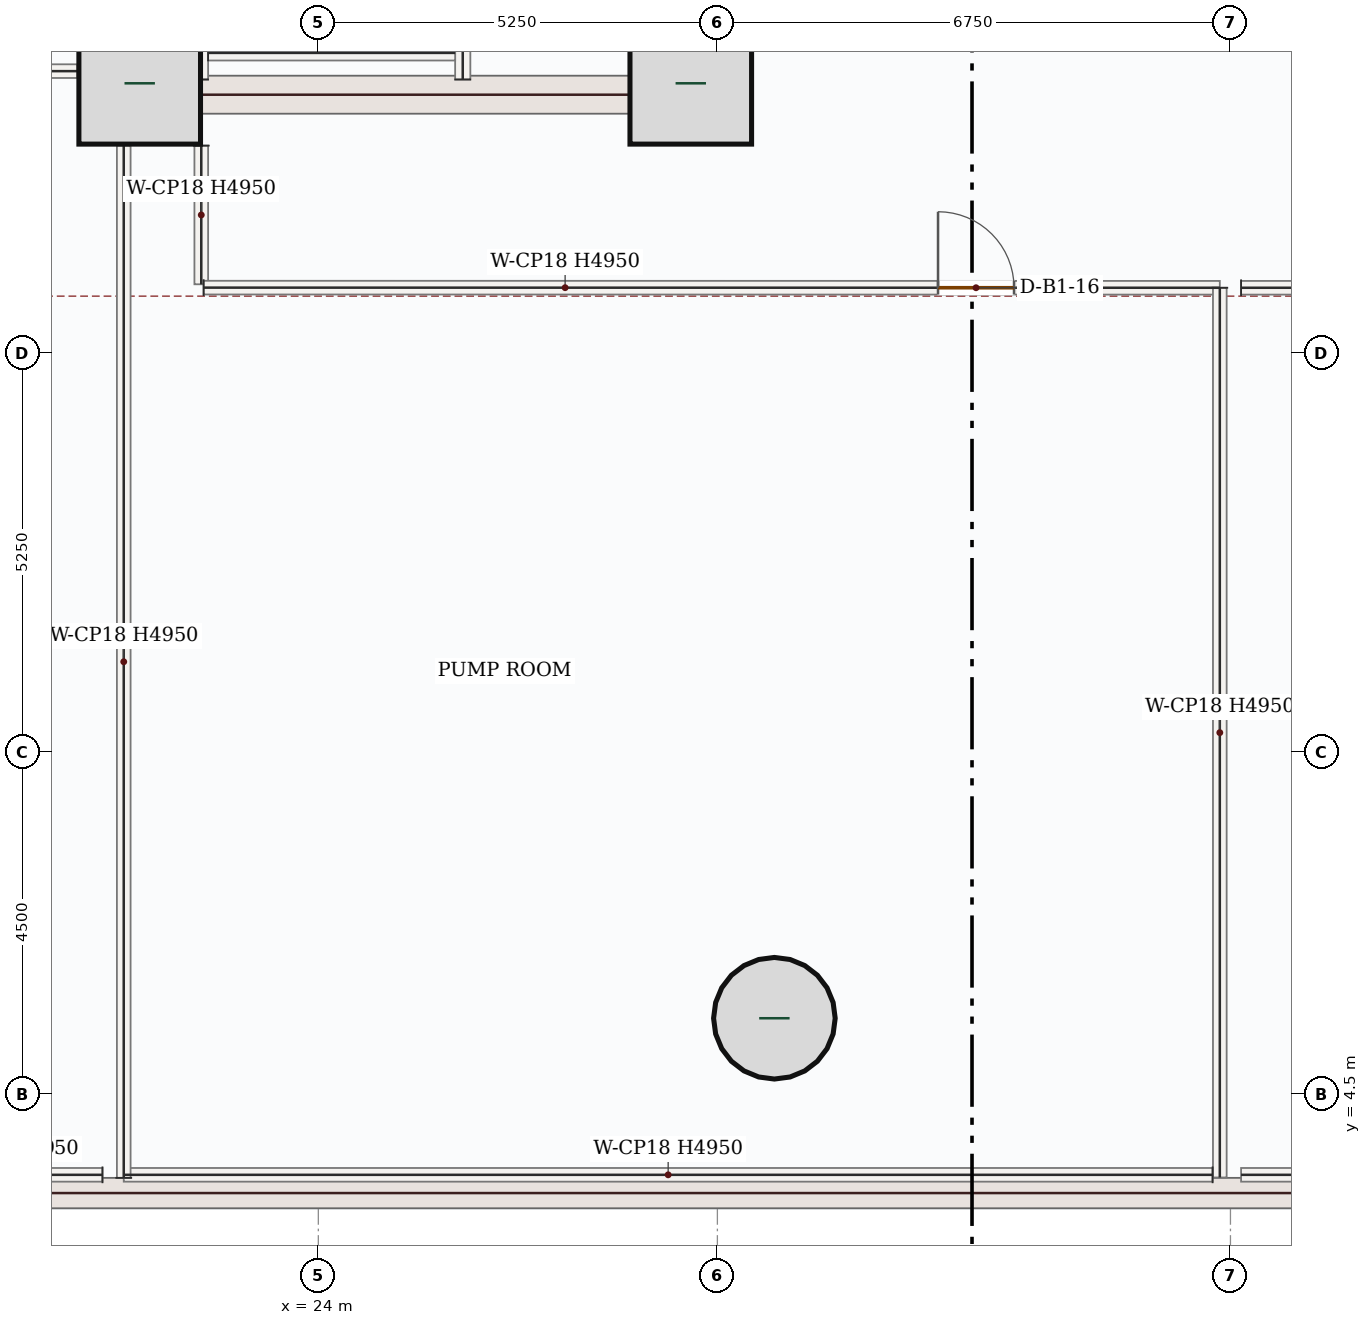
"""IFC4 building model, lengths in metres.
Left out: names, types, materials, properties, quantities, classifications, styles, units other than length and angle.
Written with IfcOpenShell. Run it as: python <this file> out.ifc"""

import sys

from ifc_helpers import new_model, si_unit, direction, frame, frame_2d, origin, origin_2d, place, context, subcontext, project, spatial, rectangle, hollow_circle, extrude, source, transform, mapped, element, fill, save


model = new_model("IFC4")
c1 = context("Model", 3, precision=1e-05, world=origin(), true_north=direction((0.0, 1.0)))
c2 = subcontext(c1, "Body", "Model", "MODEL_VIEW")
j1 = project(units=[si_unit("LENGTHUNIT", "METRE"), si_unit("PLANEANGLEUNIT", "RADIAN")], contexts=[c1])
p1 = place(None, origin())
s1 = spatial("IfcSite", under=j1, at=p1, CompositionType="ELEMENT")
p2 = place(p1, origin())
s2 = spatial("IfcBuilding", under=s1, at=p2, CompositionType="ELEMENT")
p3 = place(p2, frame((0.0, 0.0, -5.4)))
s3 = spatial("IfcBuildingStorey", under=s2, at=p3, CompositionType="ELEMENT", Elevation=-5.4)
m1 = source(origin(), c2, "Body", "SweptSolid", [
    extrude(rectangle(XDim=64.2, YDim=0.4, at=frame_2d((32.1, 0.0))), origin(), (0.0, 0.0, 1.0), 5.05),
])
p4 = place(p3, frame((3.9, 3.2, 0.0), z_axis=(0.0, 0.0, 1.0), x_axis=(1.0, 0.0, 0.0)))
e1 = element("IfcWall", 1, at=p4, inside=s3, PredefinedType="SHEAR", context=c2, shape_type="MappedRepresentation", body=[
    mapped(m1, transform((0.0, 0.0, 0.0), x_axis=(1.0, 0.0, 0.0), y_axis=(0.0, 1.0, 0.0), z_axis=(0.0, 0.0, 1.0), scale=1.0)),
])
m2 = source(origin(), c2, "Body", "SweptSolid", [
    extrude(rectangle(XDim=8.55, YDim=0.5, at=frame_2d((4.275, 0.0))), origin(), (0.0, 0.0, 1.0), 4.95),
])
p5 = place(p3, frame((21.5, 17.4, 0.0), z_axis=(0.0, 0.0, 1.0), x_axis=(0.0, 1.0, 0.0)))
e2 = element("IfcWall", 2, at=p5, inside=s3, PredefinedType="SHEAR", context=c2, shape_type="MappedRepresentation", body=[
    mapped(m2, transform((0.0, 0.0, 0.0), x_axis=(1.0, 0.0, 0.0), y_axis=(0.0, 1.0, 0.0), z_axis=(0.0, 0.0, 1.0), scale=1.0)),
])
p6 = place(p3, frame((29.0, 17.4, 0.0), z_axis=(0.0, 0.0, 1.0), x_axis=(0.0, 1.0, 0.0)))
e3 = element("IfcWall", 3, at=p6, inside=s3, PredefinedType="SHEAR", context=c2, shape_type="SweptSolid", body=[
    extrude(rectangle(XDim=8.55, YDim=0.5, at=frame_2d((4.275, 0.0))), origin(), (0.0, 0.0, 1.0), 4.95),
])
p7 = place(p6, frame((6.65, 0.0, 0.0)))
e4 = element("IfcOpeningElement", 4, at=p7, cuts=e3, PredefinedType="OPENING", context=c2, shape_type="SweptSolid", body=[
    extrude(rectangle(XDim=1.1, YDim=2.2, at=frame_2d((0.55, 1.1))), frame((0.0, 0.26, 0.0), z_axis=(0.0, -1.0, 0.0), x_axis=(1.0, 0.0, 0.0)), (0.0, 0.0, 1.0), 0.52),
])
p8 = place(p6, frame((2.7, 0.0, 0.0)))
e5 = element("IfcOpeningElement", 5, at=p8, cuts=e3, PredefinedType="OPENING", context=c2, shape_type="SweptSolid", body=[
    extrude(rectangle(XDim=0.88, YDim=2.1, at=frame_2d((0.44, 1.05))), frame((0.0, 0.26, 0.0), z_axis=(0.0, -1.0, 0.0), x_axis=(1.0, 0.0, 0.0)), (0.0, 0.0, 1.0), 0.52),
])
p9 = place(p6, frame((4.6, 0.0, 0.0)))
e6 = element("IfcOpeningElement", 6, at=p9, cuts=e3, PredefinedType="OPENING", context=c2, shape_type="SweptSolid", body=[
    extrude(rectangle(XDim=0.88, YDim=2.1, at=frame_2d((0.44, 1.05))), frame((0.0, 0.26, 0.0), z_axis=(0.0, -1.0, 0.0), x_axis=(1.0, 0.0, 0.0)), (0.0, 0.0, 1.0), 0.52),
])
m3 = source(origin(), c2, "Body", "SweptSolid", [
    extrude(rectangle(XDim=7.0, YDim=0.5, at=frame_2d((3.5, 0.0))), origin(), (0.0, 0.0, 1.0), 4.95),
])
p10 = place(p3, frame((21.75, 17.65, 0.0), z_axis=(0.0, 0.0, 1.0), x_axis=(1.0, 0.0, 0.0)))
e7 = element("IfcWall", 7, at=p10, inside=s3, PredefinedType="SHEAR", context=c2, shape_type="MappedRepresentation", body=[
    mapped(m3, transform((0.0, 0.0, 0.0), x_axis=(1.0, 0.0, 0.0), y_axis=(0.0, 1.0, 0.0), z_axis=(0.0, 0.0, 1.0), scale=1.0)),
])
m4 = source(origin(), c2, "Body", "SweptSolid", [
    extrude(rectangle(XDim=1.6, YDim=1.6, at=origin_2d()), origin(), (0.0, 0.0, 1.0), 5.4),
])
for number, where, z_axis, x_axis in (
    (8, (21.65, 17.8, 0.0), (0.0, 0.0, 1.0), (1.0, 0.0, 0.0)),
    (9, (28.9, 17.8, 0.0), (0.0, 0.0, 1.0), (1.0, 0.0, 0.0)),
):
    element("IfcColumn", number, at=place(p3, frame(where, z_axis=z_axis, x_axis=x_axis)), inside=s3, PredefinedType="COLUMN", context=c2, shape_type="MappedRepresentation", body=[
        mapped(m4, transform((0.0, 0.0, 0.0), x_axis=(1.0, 0.0, 0.0), y_axis=(0.0, 1.0, 0.0), z_axis=(0.0, 0.0, 1.0), scale=1.0)),
    ])
m5 = source(origin(), c2, "Body", "SweptSolid", [
    extrude(hollow_circle(Radius=0.8, WallThickness=0.06, at=origin_2d()), origin(), (0.0, 0.0, 1.0), 5.4),
])
p11 = place(p3, frame((30.0, 5.5, 0.0), z_axis=(0.0, 0.0, 1.0), x_axis=(1.0, 0.0, 0.0)))
e10 = element("IfcColumn", 10, at=p11, inside=s3, PredefinedType="COLUMN", context=c2, shape_type="MappedRepresentation", body=[
    mapped(m5, transform((0.0, 0.0, 0.0), x_axis=(1.0, 0.0, 0.0), y_axis=(0.0, 1.0, 0.0), z_axis=(0.0, 0.0, 1.0), scale=1.0)),
])
m6 = source(origin(), c2, "Body", "SweptSolid", [
    extrude(rectangle(XDim=7.87, YDim=0.2, at=frame_2d((3.935, 0.0))), origin(), (0.0, 0.0, 1.0), 4.95),
])
p12 = place(p3, frame((22.45, 17.85, 0.0), z_axis=(0.0, 0.0, 1.0), x_axis=(0.0, 1.0, 0.0)))
e11 = element("IfcWall", 11, at=p12, inside=s3, PredefinedType="SOLIDWALL", context=c2, shape_type="MappedRepresentation", body=[
    mapped(m6, transform((0.0, 0.0, 0.0), x_axis=(1.0, 0.0, 0.0), y_axis=(0.0, 1.0, 0.0), z_axis=(0.0, 0.0, 1.0), scale=1.0)),
])
p13 = place(p3, frame((25.9, 17.85, 0.0), z_axis=(0.0, 0.0, 1.0), x_axis=(0.0, 1.0, 0.0)))
e12 = element("IfcWall", 12, at=p13, inside=s3, PredefinedType="SOLIDWALL", context=c2, shape_type="SweptSolid", body=[
    extrude(rectangle(XDim=8.0, YDim=0.2, at=frame_2d((4.0, 0.0))), origin(), (0.0, 0.0, 1.0), 4.95),
])
p14 = place(p13, frame((6.3, 0.0, 0.0)))
e13 = element("IfcOpeningElement", 13, at=p14, cuts=e12, PredefinedType="OPENING", context=c2, shape_type="SweptSolid", body=[
    extrude(rectangle(XDim=1.05, YDim=2.15, at=frame_2d((0.525, 1.075))), frame((0.0, 0.11, 0.0), z_axis=(0.0, -1.0, 0.0), x_axis=(1.0, 0.0, 0.0)), (0.0, 0.0, 1.0), 0.22),
])
m7 = source(origin(), c2, "Body", "SweptSolid", [
    extrude(rectangle(XDim=3.25, YDim=0.2, at=frame_2d((1.625, 0.0))), origin(), (0.0, 0.0, 1.0), 4.95),
])
p15 = place(p3, frame((22.55, 18.2, 0.0), z_axis=(0.0, 0.0, 1.0), x_axis=(1.0, 0.0, 0.0)))
e14 = element("IfcWall", 14, at=p15, inside=s3, PredefinedType="SOLIDWALL", context=c2, shape_type="MappedRepresentation", body=[
    mapped(m7, transform((0.0, 0.0, 0.0), x_axis=(1.0, 0.0, 0.0), y_axis=(0.0, 1.0, 0.0), z_axis=(0.0, 0.0, 1.0), scale=1.0)),
])
m8 = source(origin(), c2, "Body", "SweptSolid", [
    extrude(rectangle(XDim=1.824, YDim=0.18, at=frame_2d((0.912, 0.0))), origin(), (0.0, 0.0, 1.0), 4.95),
])
p16 = place(p3, frame((22.46, 16.98, 0.0), z_axis=(0.0, 0.0, 1.0), x_axis=(0.0, -1.0, 0.0)))
e15 = element("IfcWall", 15, at=p16, inside=s3, PredefinedType="PARTITIONING", context=c2, shape_type="MappedRepresentation", body=[
    mapped(m8, transform((0.0, 0.0, 0.0), x_axis=(1.0, 0.0, 0.0), y_axis=(0.0, 1.0, 0.0), z_axis=(0.0, 0.0, 1.0), scale=1.0)),
])
p17 = place(p3, frame((22.491, 15.112, 0.0), z_axis=(0.0, 0.0, 1.0), x_axis=(0.99999999183, -0.000127830532, 0.0)))
e16 = element("IfcWall", 16, at=p17, inside=s3, PredefinedType="PARTITIONING", context=c2, shape_type="SweptSolid", body=[
    extrude(rectangle(XDim=13.369, YDim=0.18, at=frame_2d((6.685, 0.0))), origin(), (0.0, 0.0, 1.0), 4.95),
])
p18 = place(p17, frame((9.662, 0.0, 0.0)))
e17 = element("IfcOpeningElement", 17, at=p18, cuts=e16, PredefinedType="OPENING", context=c2, shape_type="SweptSolid", body=[
    extrude(rectangle(XDim=1.0, YDim=2.15, at=frame_2d((0.5, 1.075))), frame((0.0, 0.1, 0.0), z_axis=(0.0, -1.0, 0.0), x_axis=(1.0, 0.0, 0.0)), (0.0, 0.0, 1.0), 0.2),
])
m9 = source(origin(), c2, "Body", "SweptSolid", [
    extrude(rectangle(XDim=11.705, YDim=0.18, at=frame_2d((5.853, 0.0))), origin(), (0.0, 0.0, 1.0), 4.95),
])
p19 = place(p3, frame((35.86, 15.11, 0.0), z_axis=(0.0, 0.0, 1.0), x_axis=(0.0, -1.0, 0.0)))
e18 = element("IfcWall", 18, at=p19, inside=s3, PredefinedType="PARTITIONING", context=c2, shape_type="MappedRepresentation", body=[
    mapped(m9, transform((0.0, 0.0, 0.0), x_axis=(1.0, 0.0, 0.0), y_axis=(0.0, 1.0, 0.0), z_axis=(0.0, 0.0, 1.0), scale=1.0)),
])
m10 = source(origin(), c2, "Body", "SweptSolid", [
    extrude(rectangle(XDim=14.325, YDim=0.18, at=frame_2d((7.163, 0.0))), origin(), (0.0, 0.0, 1.0), 4.95),
])
p20 = place(p3, frame((35.765, 3.44, 0.0), z_axis=(0.0, 0.0, 1.0), x_axis=(-1.0, 0.0, 0.0)))
e19 = element("IfcWall", 19, at=p20, inside=s3, PredefinedType="PARTITIONING", context=c2, shape_type="MappedRepresentation", body=[
    mapped(m10, transform((0.0, 0.0, 0.0), x_axis=(1.0, 0.0, 0.0), y_axis=(0.0, 1.0, 0.0), z_axis=(0.0, 0.0, 1.0), scale=1.0)),
])
m11 = source(origin(), c2, "Body", "SweptSolid", [
    extrude(rectangle(XDim=13.58, YDim=0.18, at=frame_2d((6.79, 0.0))), origin(), (0.0, 0.0, 1.0), 4.95),
])
p21 = place(p3, frame((21.44, 3.4, 0.0), z_axis=(0.0, 0.0, 1.0), x_axis=(0.0, 1.0, 0.0)))
e20 = element("IfcWall", 20, at=p21, inside=s3, PredefinedType="PARTITIONING", context=c2, shape_type="MappedRepresentation", body=[
    mapped(m11, transform((0.0, 0.0, 0.0), x_axis=(1.0, 0.0, 0.0), y_axis=(0.0, 1.0, 0.0), z_axis=(0.0, 0.0, 1.0), scale=1.0)),
])
m12 = source(origin(), c2, "Body", "SweptSolid", [
    extrude(rectangle(XDim=14.325, YDim=0.18, at=frame_2d((7.163, 0.0))), origin(), (0.0, 0.0, 1.0), 4.95),
])
p22 = place(p3, frame((50.465, 3.44, 0.0), z_axis=(0.0, 0.0, 1.0), x_axis=(-1.0, 0.0, 0.0)))
e21 = element("IfcWall", 21, at=p22, inside=s3, PredefinedType="PARTITIONING", context=c2, shape_type="MappedRepresentation", body=[
    mapped(m12, transform((0.0, 0.0, 0.0), x_axis=(1.0, 0.0, 0.0), y_axis=(0.0, 1.0, 0.0), z_axis=(0.0, 0.0, 1.0), scale=1.0)),
])
p23 = place(p3, frame((36.14, 15.11, 0.0), z_axis=(0.0, 0.0, 1.0), x_axis=(0.99999999183, 0.000127830532, 0.0)))
e22 = element("IfcWall", 22, at=p23, inside=s3, PredefinedType="PARTITIONING", context=c2, shape_type="SweptSolid", body=[
    extrude(rectangle(XDim=13.369, YDim=0.18, at=frame_2d((6.685, 0.0))), origin(), (0.0, 0.0, 1.0), 4.95),
])
p24 = place(p23, frame((2.707, 0.0, 0.0)))
e23 = element("IfcOpeningElement", 23, at=p24, cuts=e22, PredefinedType="OPENING", context=c2, shape_type="SweptSolid", body=[
    extrude(rectangle(XDim=1.0, YDim=2.15, at=frame_2d((0.5, 1.075))), frame((0.0, 0.1, 0.0), z_axis=(0.0, -1.0, 0.0), x_axis=(1.0, 0.0, 0.0)), (0.0, 0.0, 1.0), 0.2),
])
m13 = source(origin(), c2, "Body", "SweptSolid", [
    extrude(rectangle(XDim=2.59, YDim=0.18, at=frame_2d((1.295, 0.0))), origin(), (0.0, 0.0, 1.0), 4.95),
])
p25 = place(p3, frame((21.16, 3.44, 0.0), z_axis=(0.0, 0.0, 1.0), x_axis=(-1.0, 0.0, 0.0)))
e24 = element("IfcWall", 24, at=p25, inside=s3, PredefinedType="PARTITIONING", context=c2, shape_type="MappedRepresentation", body=[
    mapped(m13, transform((0.0, 0.0, 0.0), x_axis=(1.0, 0.0, 0.0), y_axis=(0.0, 1.0, 0.0), z_axis=(0.0, 0.0, 1.0), scale=1.0)),
])
m14 = source(origin(), c2, "Body", "SweptSolid", [
    extrude(rectangle(XDim=1.724, YDim=0.18, at=frame_2d((0.862, 0.0))), origin(), (0.0, 0.0, 1.0), 3.992),
])
p26 = place(p3, frame((19.106, 17.96, 0.0), z_axis=(0.0, 0.0, 1.0), x_axis=(1.0, 0.0, 0.0)))
e25 = element("IfcWall", 25, at=p26, inside=s3, PredefinedType="PARTITIONING", context=c2, shape_type="MappedRepresentation", body=[
    mapped(m14, transform((0.0, 0.0, 0.0), x_axis=(1.0, 0.0, 0.0), y_axis=(0.0, 1.0, 0.0), z_axis=(0.0, 0.0, 1.0), scale=1.0)),
])
m15 = source(origin(), c2, "Body", "SweptSolid", [
    extrude(rectangle(XDim=1.0, YDim=2.15, at=frame_2d((0.5, 1.075))), frame((0.0, 0.025, 0.0), z_axis=(0.0, -1.0, 0.0), x_axis=(1.0, 0.0, 0.0)), (0.0, 0.0, 1.0), 0.05),
])
p27 = place(p18, origin())
e26 = element("IfcDoor", 26, at=p27, inside=s3, OperationType="SINGLE_SWING_LEFT", PredefinedType="DOOR", context=c2, shape_type="MappedRepresentation", body=[
    mapped(m15, transform((0.0, 0.0, 0.0), x_axis=(1.0, 0.0, 0.0), y_axis=(0.0, 1.0, 0.0), z_axis=(0.0, 0.0, 1.0), scale=1.0)),
])
fill(e17, e26)
save(model, sys.argv[1])
